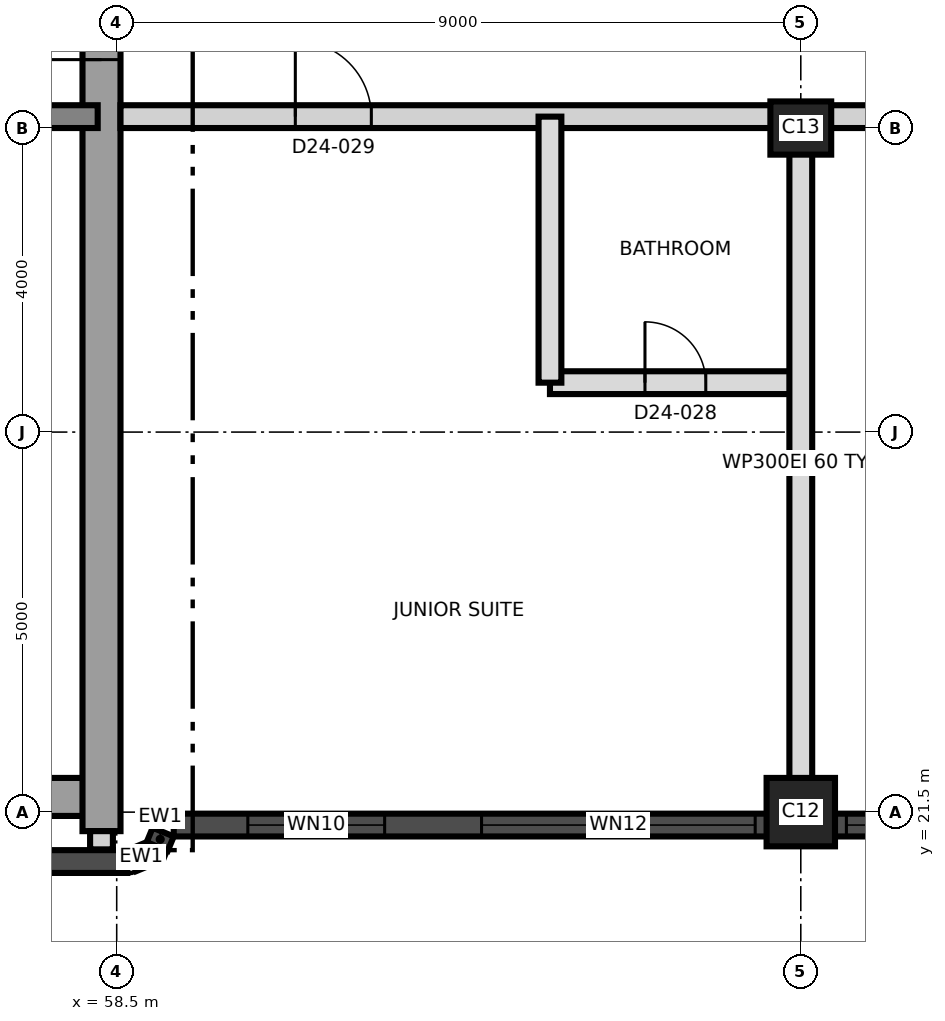
"""IFC4 building model, lengths in metres.
Left out: names, types, materials, properties, quantities, classifications, styles, units other than length and angle.
Written with IfcOpenShell. Run it as: python <this file> out.ifc"""

import sys

from ifc_helpers import new_model, si_unit, direction, frame, frame_2d, origin, origin_2d, place, context, subcontext, project, spatial, rectangle, extrude, element, fill, save


model = new_model("IFC4")
c1 = context("Model", 3, precision=1e-05, world=origin(), true_north=direction((0.0, 1.0)))
c2 = subcontext(c1, "Body", "Model", "MODEL_VIEW")
j1 = project(units=[si_unit("LENGTHUNIT", "METRE"), si_unit("PLANEANGLEUNIT", "RADIAN")], contexts=[c1])
p1 = place(None, origin())
s1 = spatial("IfcSite", under=j1, at=p1, CompositionType="ELEMENT")
p2 = place(p1, origin())
s2 = spatial("IfcBuilding", under=s1, at=p2, CompositionType="ELEMENT")
p3 = place(p2, frame((0.0, 0.0, 214.3)))
s3 = spatial("IfcBuildingStorey", under=s2, at=p3, CompositionType="ELEMENT", Elevation=214.3)
p4 = place(p3, frame((31.25, 21.7, 0.0), z_axis=(0.0, 0.0, 1.0), x_axis=(1.0, 0.0, 0.0)))
e1 = element("IfcWall", 1, at=p4, inside=s3, PredefinedType="SHEAR", context=c2, shape_type="SweptSolid", body=[
    extrude(rectangle(XDim=27.0, YDim=0.5, at=frame_2d((13.5, 0.0))), origin(), (0.0, 0.0, 1.0), 3.7),
])
p5 = place(p3, frame((58.3, 21.25, 0.0), z_axis=(0.0, 0.0, 1.0), x_axis=(0.0, 1.0, 0.0)))
e2 = element("IfcWall", 2, at=p5, inside=s3, PredefinedType="SHEAR", context=c2, shape_type="SweptSolid", body=[
    extrude(rectangle(XDim=18.5, YDim=0.5, at=frame_2d((9.25, 0.0))), origin(), (0.0, 0.0, 1.0), 3.7),
])
p6 = place(p5, frame((10.15, 0.0, 0.0)))
e3 = element("IfcOpeningElement", 3, at=p6, cuts=e2, PredefinedType="OPENING", context=c2, shape_type="SweptSolid", body=[
    extrude(rectangle(XDim=1.2, YDim=2.1, at=frame_2d((0.6, 1.05))), frame((0.0, 0.26, 0.0), z_axis=(0.0, -1.0, 0.0), x_axis=(1.0, 0.0, 0.0)), (0.0, 0.0, 1.0), 0.52),
])
p7 = place(p3, frame((31.75, 30.65, 0.0), z_axis=(0.0, 0.0, 1.0), x_axis=(1.0, 0.0, 0.0)))
e4 = element("IfcWall", 4, at=p7, inside=s3, PredefinedType="SHEAR", context=c2, shape_type="SweptSolid", body=[
    extrude(rectangle(XDim=26.5, YDim=0.3, at=frame_2d((13.25, 0.0))), origin(), (0.0, 0.0, 1.0), 3.7),
])
p8 = place(p7, frame((24.75, 0.0, 0.0)))
e5 = element("IfcOpeningElement", 5, at=p8, cuts=e4, PredefinedType="OPENING", context=c2, shape_type="SweptSolid", body=[
    extrude(rectangle(XDim=1.0, YDim=2.1, at=frame_2d((0.5, 1.05))), frame((0.0, 0.16, 0.0), z_axis=(0.0, -1.0, 0.0), x_axis=(1.0, 0.0, 0.0)), (0.0, 0.0, 1.0), 0.32),
])
p9 = place(p3, frame((67.5, 21.5, 0.0), z_axis=(0.0, 0.0, 1.0), x_axis=(1.0, 0.0, 0.0)))
e6 = element("IfcColumn", 6, at=p9, inside=s3, PredefinedType="COLUMN", context=c2, shape_type="SweptSolid", body=[
    extrude(rectangle(XDim=0.9, YDim=0.9, at=origin_2d()), origin(), (0.0, 0.0, 1.0), 3.7),
])
p10 = place(p3, frame((67.5, 30.5, 0.0), z_axis=(0.0, 0.0, 1.0), x_axis=(1.0, 0.0, 0.0)))
e7 = element("IfcColumn", 7, at=p10, inside=s3, PredefinedType="COLUMN", context=c2, shape_type="SweptSolid", body=[
    extrude(rectangle(XDim=0.8, YDim=0.7, at=origin_2d()), origin(), (0.0, 0.0, 1.0), 3.7),
])
p11 = place(p3, frame((31.36, 20.85, 0.0), z_axis=(0.0, 0.0, 1.0), x_axis=(1.0, 0.0, 0.0)))
e8 = element("IfcWall", 8, at=p11, inside=s3, PredefinedType="SOLIDWALL", context=c2, shape_type="SweptSolid", body=[
    extrude(rectangle(XDim=27.281, YDim=0.3, at=frame_2d((13.64, 0.0))), origin(), (0.0, 0.0, 1.0), 3.4),
])
p12 = place(p3, frame((58.698, 20.861, 0.0), z_axis=(0.0, 0.0, 1.0), x_axis=(0.923757413239, 0.38297812142, 0.0)))
e9 = element("IfcWall", 9, at=p12, inside=s3, PredefinedType="SOLIDWALL", context=c2, shape_type="SweptSolid", body=[
    extrude(rectangle(XDim=0.275, YDim=0.3, at=frame_2d((0.138, 0.0))), origin(), (0.0, 0.0, 1.0), 3.4),
])
p13 = place(p3, frame((59.033, 21.048, 0.0), z_axis=(0.0, 0.0, 1.0), x_axis=(0.383262727373, 0.923639367831, 0.0)))
e10 = element("IfcWall", 10, at=p13, inside=s3, PredefinedType="SOLIDWALL", context=c2, shape_type="SweptSolid", body=[
    extrude(rectangle(XDim=0.205, YDim=0.3, at=frame_2d((0.103, 0.0))), origin(), (0.0, 0.0, 1.0), 3.4),
])
p14 = place(p3, frame((59.25, 21.33, 0.0), z_axis=(0.0, 0.0, 1.0), x_axis=(1.0, 0.0, 0.0)))
e11 = element("IfcWall", 11, at=p14, inside=s3, PredefinedType="SOLIDWALL", context=c2, shape_type="SweptSolid", body=[
    extrude(rectangle(XDim=28.234, YDim=0.3, at=frame_2d((14.117, 0.0))), origin(), (0.0, 0.0, 1.0), 3.4),
])
p15 = place(p14, frame((0.975, 0.0, 0.3)))
e12 = element("IfcOpeningElement", 12, at=p15, cuts=e11, PredefinedType="OPENING", context=c2, shape_type="SweptSolid", body=[
    extrude(rectangle(XDim=1.8, YDim=2.4, at=frame_2d((0.9, 1.2))), frame((0.0, 0.16, 0.0), z_axis=(0.0, -1.0, 0.0), x_axis=(1.0, 0.0, 0.0)), (0.0, 0.0, 1.0), 0.32),
])
p16 = place(p14, frame((4.05, 0.0, 0.9)))
e13 = element("IfcOpeningElement", 13, at=p16, cuts=e11, PredefinedType="OPENING", context=c2, shape_type="SweptSolid", body=[
    extrude(rectangle(XDim=3.6, YDim=1.5, at=frame_2d((1.8, 0.75))), frame((0.0, 0.16, 0.0), z_axis=(0.0, -1.0, 0.0), x_axis=(1.0, 0.0, 0.0)), (0.0, 0.0, 1.0), 0.32),
])
p17 = place(p14, frame((8.85, 0.0, 0.9)))
e14 = element("IfcOpeningElement", 14, at=p17, cuts=e11, PredefinedType="OPENING", context=c2, shape_type="SweptSolid", body=[
    extrude(rectangle(XDim=3.6, YDim=1.5, at=frame_2d((1.8, 0.75))), frame((0.0, 0.16, 0.0), z_axis=(0.0, -1.0, 0.0), x_axis=(1.0, 0.0, 0.0)), (0.0, 0.0, 1.0), 0.32),
])
p18 = place(p14, frame((13.05, 0.0, 0.9)))
e15 = element("IfcOpeningElement", 15, at=p18, cuts=e11, PredefinedType="OPENING", context=c2, shape_type="SweptSolid", body=[
    extrude(rectangle(XDim=3.6, YDim=1.5, at=frame_2d((1.8, 0.75))), frame((0.0, 0.16, 0.0), z_axis=(0.0, -1.0, 0.0), x_axis=(1.0, 0.0, 0.0)), (0.0, 0.0, 1.0), 0.32),
])
p19 = place(p14, frame((17.85, 0.0, 0.9)))
e16 = element("IfcOpeningElement", 16, at=p19, cuts=e11, PredefinedType="OPENING", context=c2, shape_type="SweptSolid", body=[
    extrude(rectangle(XDim=3.6, YDim=1.5, at=frame_2d((1.8, 0.75))), frame((0.0, 0.16, 0.0), z_axis=(0.0, -1.0, 0.0), x_axis=(1.0, 0.0, 0.0)), (0.0, 0.0, 1.0), 0.32),
])
p20 = place(p14, frame((22.05, 0.0, 0.9)))
e17 = element("IfcOpeningElement", 17, at=p20, cuts=e11, PredefinedType="OPENING", context=c2, shape_type="SweptSolid", body=[
    extrude(rectangle(XDim=3.6, YDim=1.5, at=frame_2d((1.8, 0.75))), frame((0.0, 0.16, 0.0), z_axis=(0.0, -1.0, 0.0), x_axis=(1.0, 0.0, 0.0)), (0.0, 0.0, 1.0), 0.32),
])
p21 = place(p3, frame((64.2, 27.15, 0.0), z_axis=(0.0, 0.0, 1.0), x_axis=(1.0, 0.0, 0.0)))
e18 = element("IfcWall", 18, at=p21, inside=s3, PredefinedType="PARTITIONING", context=c2, shape_type="SweptSolid", body=[
    extrude(rectangle(XDim=3.3, YDim=0.3, at=frame_2d((1.65, 0.0))), origin(), (0.0, 0.0, 1.0), 3.4),
])
p22 = place(p21, frame((1.25, 0.0, 0.0)))
e19 = element("IfcOpeningElement", 19, at=p22, cuts=e18, PredefinedType="OPENING", context=c2, shape_type="SweptSolid", body=[
    extrude(rectangle(XDim=0.8, YDim=2.1, at=frame_2d((0.4, 1.05))), frame((0.0, 0.16, 0.0), z_axis=(0.0, -1.0, 0.0), x_axis=(1.0, 0.0, 0.0)), (0.0, 0.0, 1.0), 0.32),
])
p23 = place(p3, frame((58.55, 30.65, 0.0), z_axis=(0.0, 0.0, 1.0), x_axis=(1.0, 0.0, 0.0)))
e20 = element("IfcWall", 20, at=p23, inside=s3, PredefinedType="PARTITIONING", context=c2, shape_type="SweptSolid", body=[
    extrude(rectangle(XDim=26.78, YDim=0.3, at=frame_2d((13.39, 0.0))), origin(), (0.0, 0.0, 1.0), 3.4),
])
p24 = place(p23, frame((2.3, 0.0, 0.0)))
e21 = element("IfcOpeningElement", 21, at=p24, cuts=e20, PredefinedType="OPENING", context=c2, shape_type="SweptSolid", body=[
    extrude(rectangle(XDim=1.0, YDim=2.4, at=frame_2d((0.5, 1.2))), frame((0.0, 0.16, 0.0), z_axis=(0.0, -1.0, 0.0), x_axis=(1.0, 0.0, 0.0)), (0.0, 0.0, 1.0), 0.32),
])
p25 = place(p23, frame((10.1, 0.0, 0.0)))
e22 = element("IfcOpeningElement", 22, at=p25, cuts=e20, PredefinedType="OPENING", context=c2, shape_type="SweptSolid", body=[
    extrude(rectangle(XDim=1.0, YDim=2.1, at=frame_2d((0.5, 1.05))), frame((0.0, 0.16, 0.0), z_axis=(0.0, -1.0, 0.0), x_axis=(1.0, 0.0, 0.0)), (0.0, 0.0, 1.0), 0.32),
])
p26 = place(p23, frame((15.95, 0.0, 0.0)))
e23 = element("IfcOpeningElement", 23, at=p26, cuts=e20, PredefinedType="OPENING", context=c2, shape_type="SweptSolid", body=[
    extrude(rectangle(XDim=1.0, YDim=2.1, at=frame_2d((0.5, 1.05))), frame((0.0, 0.16, 0.0), z_axis=(0.0, -1.0, 0.0), x_axis=(1.0, 0.0, 0.0)), (0.0, 0.0, 1.0), 0.32),
])
p27 = place(p23, frame((19.085, 0.0, 0.0)))
e24 = element("IfcOpeningElement", 24, at=p27, cuts=e20, PredefinedType="OPENING", context=c2, shape_type="SweptSolid", body=[
    extrude(rectangle(XDim=1.2, YDim=2.1, at=frame_2d((0.6, 1.05))), frame((0.0, 0.16, 0.0), z_axis=(0.0, -1.0, 0.0), x_axis=(1.0, 0.0, 0.0)), (0.0, 0.0, 1.0), 0.32),
])
p28 = place(p23, frame((22.335, 0.0, 0.0)))
e25 = element("IfcOpeningElement", 25, at=p28, cuts=e20, PredefinedType="OPENING", context=c2, shape_type="SweptSolid", body=[
    extrude(rectangle(XDim=1.0, YDim=2.1, at=frame_2d((0.5, 1.05))), frame((0.0, 0.16, 0.0), z_axis=(0.0, -1.0, 0.0), x_axis=(1.0, 0.0, 0.0)), (0.0, 0.0, 1.0), 0.32),
])
p29 = place(p3, frame((64.2, 27.15, 0.0), z_axis=(0.0, 0.0, 1.0), x_axis=(0.0, 1.0, 0.0)))
e26 = element("IfcWall", 26, at=p29, inside=s3, PredefinedType="PARTITIONING", context=c2, shape_type="SweptSolid", body=[
    extrude(rectangle(XDim=3.5, YDim=0.3, at=frame_2d((1.75, 0.0))), origin(), (0.0, 0.0, 1.0), 3.4),
])
p30 = place(p3, frame((67.5, 21.53, 0.0), z_axis=(0.0, 0.0, 1.0), x_axis=(0.0, 1.0, 0.0)))
e27 = element("IfcWall", 27, at=p30, inside=s3, PredefinedType="PARTITIONING", context=c2, shape_type="SweptSolid", body=[
    extrude(rectangle(XDim=9.12, YDim=0.3, at=frame_2d((4.56, 0.0))), origin(), (0.0, 0.0, 1.0), 3.4),
])
p31 = place(p3, frame((58.3, 21.25, 0.0), z_axis=(0.0, 0.0, 1.0), x_axis=(0.0, -1.0, 0.0)))
e28 = element("IfcWall", 28, at=p31, inside=s3, PredefinedType="PARTITIONING", context=c2, shape_type="SweptSolid", body=[
    extrude(rectangle(XDim=0.24, YDim=0.3, at=frame_2d((0.12, 0.0))), origin(), (0.0, 0.0, 1.0), 3.4),
])
p32 = place(p15, origin())
e29 = element("IfcWindow", 29, at=p32, inside=s3, PartitioningType="SINGLE_PANEL", PredefinedType="WINDOW", context=c2, shape_type="SweptSolid", body=[
    extrude(rectangle(XDim=1.8, YDim=2.4, at=frame_2d((0.9, 1.2))), frame((0.0, 0.03, 0.0), z_axis=(0.0, -1.0, 0.0), x_axis=(1.0, 0.0, 0.0)), (0.0, 0.0, 1.0), 0.06),
])
fill(e12, e29)
p33 = place(p16, origin())
e30 = element("IfcWindow", 30, at=p33, inside=s3, PartitioningType="SINGLE_PANEL", PredefinedType="WINDOW", context=c2, shape_type="SweptSolid", body=[
    extrude(rectangle(XDim=3.6, YDim=1.5, at=frame_2d((1.8, 0.75))), frame((0.0, 0.03, 0.0), z_axis=(0.0, -1.0, 0.0), x_axis=(1.0, 0.0, 0.0)), (0.0, 0.0, 1.0), 0.06),
])
fill(e13, e30)
p34 = place(p17, origin())
e31 = element("IfcWindow", 31, at=p34, inside=s3, PartitioningType="SINGLE_PANEL", PredefinedType="WINDOW", context=c2, shape_type="SweptSolid", body=[
    extrude(rectangle(XDim=3.6, YDim=1.5, at=frame_2d((1.8, 0.75))), frame((0.0, 0.03, 0.0), z_axis=(0.0, -1.0, 0.0), x_axis=(1.0, 0.0, 0.0)), (0.0, 0.0, 1.0), 0.06),
])
fill(e14, e31)
p35 = place(p6, origin())
e32 = element("IfcDoor", 32, at=p35, inside=s3, OperationType="SINGLE_SWING_LEFT", PredefinedType="DOOR", context=c2, shape_type="SweptSolid", body=[
    extrude(rectangle(XDim=1.2, YDim=2.1, at=frame_2d((0.6, 1.05))), frame((0.0, 0.025, 0.0), z_axis=(0.0, -1.0, 0.0), x_axis=(1.0, 0.0, 0.0)), (0.0, 0.0, 1.0), 0.05),
])
fill(e3, e32)
p36 = place(p22, origin())
e33 = element("IfcDoor", 33, at=p36, inside=s3, OperationType="SINGLE_SWING_LEFT", PredefinedType="DOOR", context=c2, shape_type="SweptSolid", body=[
    extrude(rectangle(XDim=0.8, YDim=2.1, at=frame_2d((0.4, 1.05))), frame((0.0, 0.025, 0.0), z_axis=(0.0, -1.0, 0.0), x_axis=(1.0, 0.0, 0.0)), (0.0, 0.0, 1.0), 0.05),
])
fill(e19, e33)
p37 = place(p24, origin())
e34 = element("IfcDoor", 34, at=p37, inside=s3, OperationType="SINGLE_SWING_LEFT", PredefinedType="DOOR", context=c2, shape_type="SweptSolid", body=[
    extrude(rectangle(XDim=1.0, YDim=2.4, at=frame_2d((0.5, 1.2))), frame((0.0, 0.025, 0.0), z_axis=(0.0, -1.0, 0.0), x_axis=(1.0, 0.0, 0.0)), (0.0, 0.0, 1.0), 0.05),
])
fill(e21, e34)
save(model, sys.argv[1])
